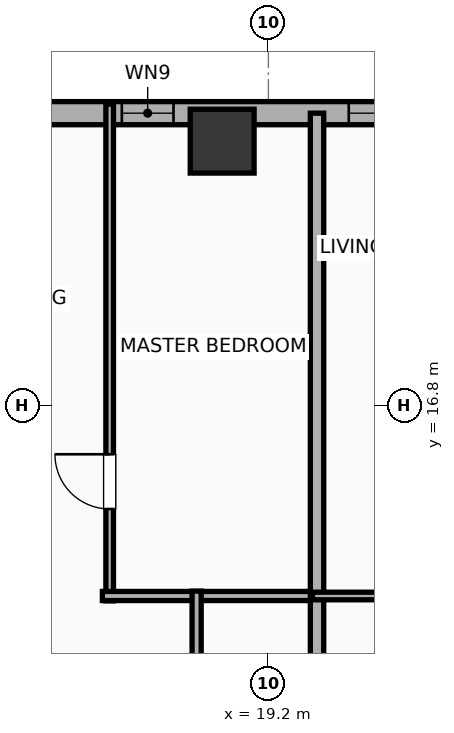
"""IFC4 building model, lengths in metres.
Left out: names, types, materials, properties, quantities, classifications, styles, units other than length and angle.
Written with IfcOpenShell. Run it as: python <this file> out.ifc"""

import sys

from ifc_helpers import new_model, si_unit, direction, frame, frame_2d, origin, origin_2d, place, context, subcontext, project, spatial, rectangle, hollow_rectangle, extrude, element, fill, save


model = new_model("IFC4")
c1 = context("Model", 3, precision=1e-05, world=origin(), true_north=direction((0.0, 1.0)))
c2 = subcontext(c1, "Body", "Model", "MODEL_VIEW")
j1 = project(units=[si_unit("LENGTHUNIT", "METRE"), si_unit("PLANEANGLEUNIT", "RADIAN")], contexts=[c1])
p1 = place(None, origin())
s1 = spatial("IfcSite", under=j1, at=p1, CompositionType="ELEMENT")
p2 = place(p1, origin())
s2 = spatial("IfcBuilding", under=s1, at=p2, CompositionType="ELEMENT")
p3 = place(p2, frame((0.0, 0.0, 117.0)))
s3 = spatial("IfcBuildingStorey", under=s2, at=p3, CompositionType="ELEMENT", Elevation=117.0)
p4 = place(p3, frame((18.44, 21.15, 0.0), z_axis=(0.0, 0.0, 1.0), x_axis=(1.0, 0.0, 0.0)))
e1 = element("IfcColumn", 1, at=p4, inside=s3, PredefinedType="COLUMN", context=c2, shape_type="SweptSolid", body=[
    extrude(hollow_rectangle(XDim=1.05, YDim=1.05, WallThickness=0.036, at=origin_2d()), origin(), (0.0, 0.0, 1.0), 3.9),
])
p5 = place(p3, frame((10.762, 21.61, 0.0), z_axis=(0.0, 0.0, 1.0), x_axis=(1.0, 0.0, 0.0)))
e2 = element("IfcWall", 2, at=p5, inside=s3, PredefinedType="ELEMENTEDWALL", context=c2, shape_type="SweptSolid", body=[
    extrude(rectangle(XDim=18.619, YDim=0.38, at=frame_2d((9.31, 0.0))), origin(), (0.0, 0.0, 1.0), 3.65),
])
p6 = place(p5, frame((9.76, 0.0, 0.75)))
e3 = element("IfcOpeningElement", 3, at=p6, cuts=e2, PredefinedType="OPENING", context=c2, shape_type="SweptSolid", body=[
    extrude(rectangle(XDim=2.4, YDim=2.1, at=frame_2d((1.2, 1.05))), frame((0.0, 0.2, 0.0), z_axis=(0.0, -1.0, 0.0), x_axis=(1.0, 0.0, 0.0)), (0.0, 0.0, 1.0), 0.4),
])
p7 = place(p5, frame((2.952, 0.0, 0.75)))
e4 = element("IfcOpeningElement", 4, at=p7, cuts=e2, PredefinedType="OPENING", context=c2, shape_type="SweptSolid", body=[
    extrude(rectangle(XDim=1.2, YDim=2.05, at=frame_2d((0.6, 1.025))), frame((0.0, 0.2, 0.0), z_axis=(0.0, -1.0, 0.0), x_axis=(1.0, 0.0, 0.0)), (0.0, 0.0, 1.0), 0.4),
])
p8 = place(p5, frame((6.028, 0.0, 0.75)))
e5 = element("IfcOpeningElement", 5, at=p8, cuts=e2, PredefinedType="OPENING", context=c2, shape_type="SweptSolid", body=[
    extrude(rectangle(XDim=0.85, YDim=2.05, at=frame_2d((0.425, 1.025))), frame((0.0, 0.2, 0.0), z_axis=(0.0, -1.0, 0.0), x_axis=(1.0, 0.0, 0.0)), (0.0, 0.0, 1.0), 0.4),
])
p9 = place(p5, frame((13.542, 0.0, 0.75)))
e6 = element("IfcOpeningElement", 6, at=p9, cuts=e2, PredefinedType="OPENING", context=c2, shape_type="SweptSolid", body=[
    extrude(rectangle(XDim=1.2, YDim=2.05, at=frame_2d((0.6, 1.025))), frame((0.0, 0.2, 0.0), z_axis=(0.0, -1.0, 0.0), x_axis=(1.0, 0.0, 0.0)), (0.0, 0.0, 1.0), 0.4),
])
p10 = place(p5, frame((16.188, 0.0, 0.75)))
e7 = element("IfcOpeningElement", 7, at=p10, cuts=e2, PredefinedType="OPENING", context=c2, shape_type="SweptSolid", body=[
    extrude(rectangle(XDim=1.2, YDim=2.05, at=frame_2d((0.6, 1.025))), frame((0.0, 0.2, 0.0), z_axis=(0.0, -1.0, 0.0), x_axis=(1.0, 0.0, 0.0)), (0.0, 0.0, 1.0), 0.4),
])
p11 = place(p3, frame((16.59, 13.59, 0.0), z_axis=(0.0, 0.0, 1.0), x_axis=(0.0, 1.0, 0.0)))
e8 = element("IfcWall", 8, at=p11, inside=s3, PredefinedType="PARTITIONING", context=c2, shape_type="SweptSolid", body=[
    extrude(rectangle(XDim=8.17, YDim=0.125, at=frame_2d((4.085, 0.0))), origin(), (0.0, 0.0, 1.0), 3.65),
])
p12 = place(p11, frame((1.511, 0.0, 0.0)))
e9 = element("IfcOpeningElement", 9, at=p12, cuts=e8, PredefinedType="OPENING", context=c2, shape_type="SweptSolid", body=[
    extrude(rectangle(XDim=0.9, YDim=2.05, at=frame_2d((0.45, 1.025))), frame((0.0, 0.073, 0.0), z_axis=(0.0, -1.0, 0.0), x_axis=(1.0, 0.0, 0.0)), (0.0, 0.0, 1.0), 0.145),
])
p13 = place(p3, frame((16.47, 13.67, 0.0), z_axis=(0.0, 0.0, 1.0), x_axis=(1.0, 0.0, 0.0)))
e10 = element("IfcWall", 10, at=p13, inside=s3, PredefinedType="PLUMBINGWALL", context=c2, shape_type="SweptSolid", body=[
    extrude(rectangle(XDim=3.605, YDim=0.15, at=frame_2d((1.802, 0.0))), origin(), (0.0, 0.0, 1.0), 3.65),
])
p14 = place(p3, frame((18.02, 10.43, 0.0), z_axis=(0.0, 0.0, 1.0), x_axis=(0.0, 1.0, 0.0)))
e11 = element("IfcWall", 11, at=p14, inside=s3, PredefinedType="PLUMBINGWALL", context=c2, shape_type="SweptSolid", body=[
    extrude(rectangle(XDim=3.32, YDim=0.15, at=frame_2d((1.66, 0.0))), origin(), (0.0, 0.0, 1.0), 3.65),
])
p15 = place(p14, frame((1.21, 0.0, 0.0)))
e12 = element("IfcOpeningElement", 12, at=p15, cuts=e11, PredefinedType="OPENING", context=c2, shape_type="SweptSolid", body=[
    extrude(rectangle(XDim=0.9, YDim=2.05, at=frame_2d((0.45, 1.025))), frame((0.0, 0.085, 0.0), z_axis=(0.0, -1.0, 0.0), x_axis=(1.0, 0.0, 0.0)), (0.0, 0.0, 1.0), 0.17),
])
p16 = place(p3, frame((20.0, 10.37, 0.0), z_axis=(0.0, 0.0, 1.0), x_axis=(0.0, 1.0, 0.0)))
e13 = element("IfcWall", 13, at=p16, inside=s3, PredefinedType="PARTITIONING", context=c2, shape_type="SweptSolid", body=[
    extrude(rectangle(XDim=11.24, YDim=0.22, at=frame_2d((5.62, 0.0))), origin(), (0.0, 0.0, 1.0), 3.65),
])
p17 = place(p3, frame((19.925, 13.67, 0.0), z_axis=(0.0, 0.0, 1.0), x_axis=(1.0, 0.0, 0.0)))
e14 = element("IfcWall", 14, at=p17, inside=s3, PredefinedType="PARTITIONING", context=c2, shape_type="SweptSolid", body=[
    extrude(rectangle(XDim=2.505, YDim=0.125, at=frame_2d((1.252, 0.0))), origin(), (0.0, 0.0, 1.0), 3.65),
])
p18 = place(p6, origin())
e15 = element("IfcWindow", 15, at=p18, inside=s3, PartitioningType="SINGLE_PANEL", PredefinedType="WINDOW", context=c2, shape_type="SweptSolid", body=[
    extrude(rectangle(XDim=2.4, YDim=2.1, at=frame_2d((1.2, 1.05))), frame((0.0, 0.03, 0.0), z_axis=(0.0, -1.0, 0.0), x_axis=(1.0, 0.0, 0.0)), (0.0, 0.0, 1.0), 0.06),
])
fill(e3, e15)
p19 = place(p8, origin())
e16 = element("IfcWindow", 16, at=p19, inside=s3, PartitioningType="SINGLE_PANEL", PredefinedType="WINDOW", context=c2, shape_type="SweptSolid", body=[
    extrude(rectangle(XDim=0.85, YDim=2.05, at=frame_2d((0.425, 1.025))), frame((0.0, 0.03, 0.0), z_axis=(0.0, -1.0, 0.0), x_axis=(1.0, 0.0, 0.0)), (0.0, 0.0, 1.0), 0.06),
])
fill(e5, e16)
p20 = place(p12, origin())
e17 = element("IfcDoor", 17, at=p20, inside=s3, OperationType="SINGLE_SWING_RIGHT", PredefinedType="DOOR", context=c2, shape_type="SweptSolid", body=[
    extrude(rectangle(XDim=0.9, YDim=2.05, at=frame_2d((0.45, 1.025))), frame((0.0, 0.025, 0.0), z_axis=(0.0, -1.0, 0.0), x_axis=(1.0, 0.0, 0.0)), (0.0, 0.0, 1.0), 0.05),
])
fill(e9, e17)
save(model, sys.argv[1])
